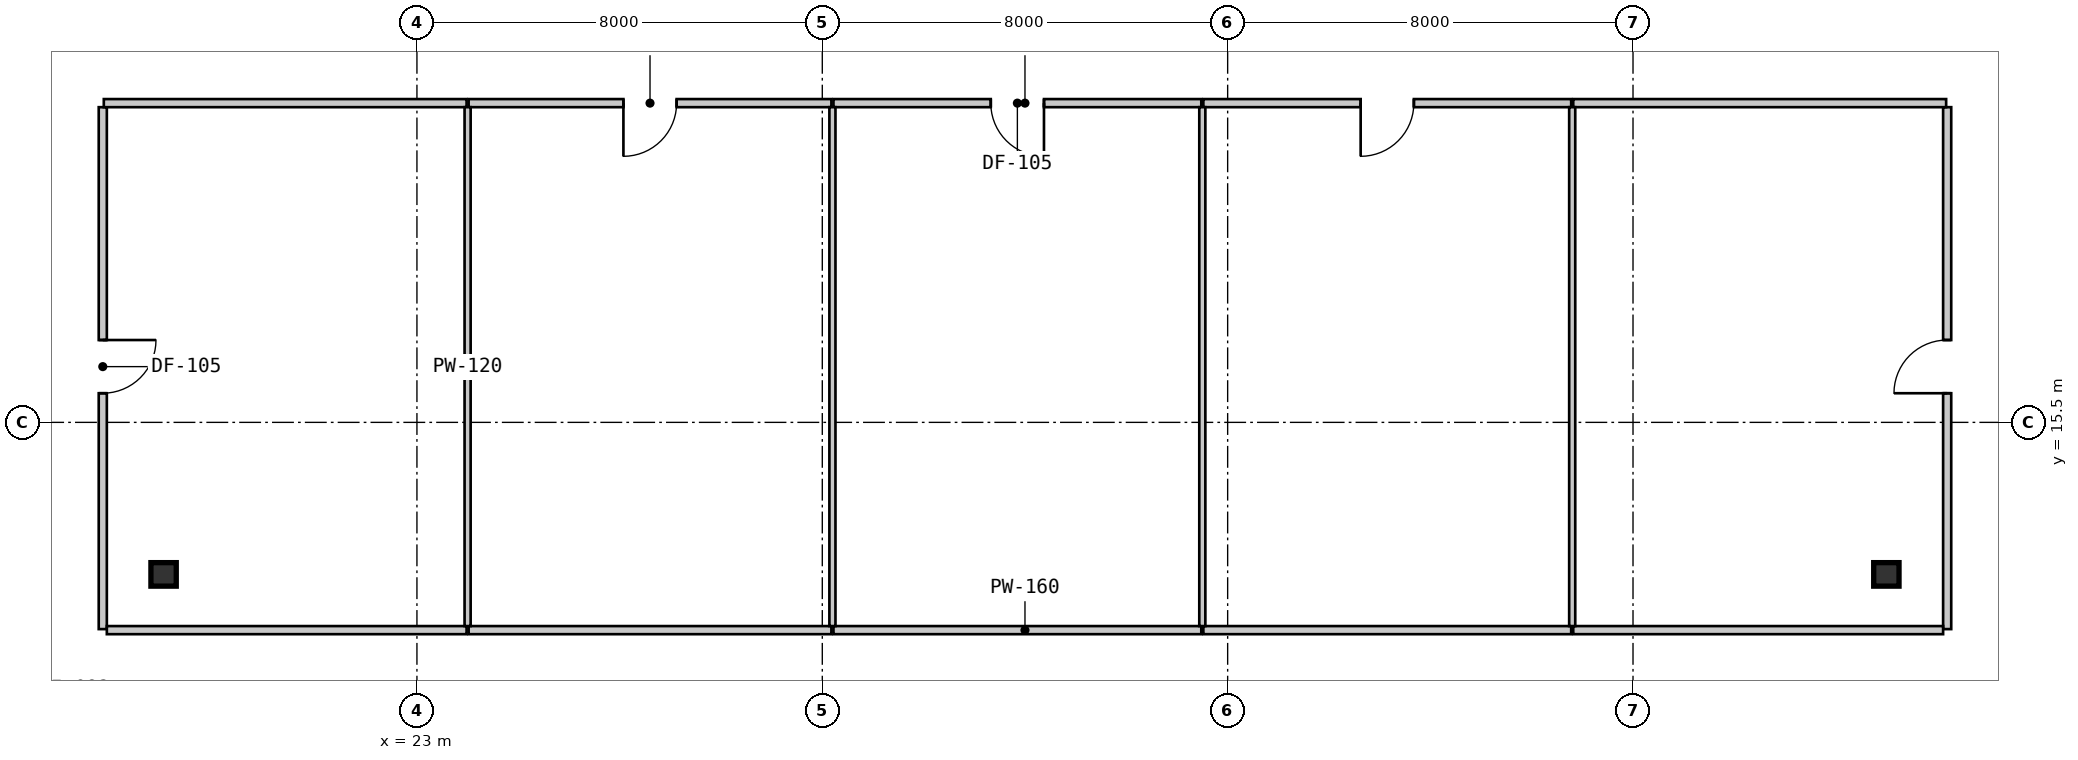
"""IFC4 building model, lengths in metres.
Left out: names, types, materials, properties, quantities, classifications, styles, units other than length and angle.
Written with IfcOpenShell. Run it as: python <this file> out.ifc"""

import sys

from ifc_helpers import new_model, si_unit, direction, frame, frame_2d, origin, origin_2d, place, context, subcontext, project, spatial, rectangle, i_section, extrude, source, transform, mapped, element, fill, save


model = new_model("IFC4")
c1 = context("Model", 3, precision=1e-05, world=origin(), true_north=direction((0.0, 1.0)))
c2 = subcontext(c1, "Body", "Model", "MODEL_VIEW")
j1 = project(units=[si_unit("LENGTHUNIT", "METRE"), si_unit("PLANEANGLEUNIT", "RADIAN")], contexts=[c1])
p1 = place(None, origin())
s1 = spatial("IfcSite", under=j1, at=p1, CompositionType="ELEMENT")
p2 = place(p1, origin())
s2 = spatial("IfcBuilding", under=s1, at=p2, CompositionType="ELEMENT")
p3 = place(p2, frame((0.0, 0.0, 32.55)))
s3 = spatial("IfcBuildingStorey", under=s2, at=p3, CompositionType="ELEMENT", Elevation=32.55)
m1 = source(origin(), c2, "Body", "SweptSolid", [
    extrude(i_section(OverallWidth=0.5, OverallDepth=0.464, WebThickness=0.022, FlangeThickness=0.034, at=origin_2d()), origin(), (0.0, 0.0, 1.0), 3.15),
])
for number, where, z_axis, x_axis in (
    (1, (18.0, 12.5, 0.0), (0.0, 0.0, 1.0), (1.0, 0.0, 0.0)),
    (2, (52.0, 12.5, 0.0), (0.0, 0.0, 1.0), (1.0, 0.0, 0.0)),
):
    element("IfcColumn", number, at=place(p3, frame(where, z_axis=z_axis, x_axis=x_axis)), inside=s3, PredefinedType="COLUMN", context=c2, shape_type="MappedRepresentation", body=[
        mapped(m1, transform((0.0, 0.0, 0.0), scale=1.0)),
    ])
m2 = source(origin(), c2, "Body", "SweptSolid", [
    extrude(rectangle(XDim=10.3, YDim=0.16, at=frame_2d((5.15, 0.0))), origin(), (0.0, 0.0, 1.0), 2.93),
])
p4 = place(p3, frame((16.8, 21.72, 0.0), z_axis=(0.0, 0.0, 1.0), x_axis=(0.0, -1.0, 0.0)))
e3 = element("IfcWall", 3, at=p4, inside=s3, PredefinedType="PARTITIONING", context=c2, shape_type="MappedRepresentation", body=[
    mapped(m2, transform((0.0, 0.0, 0.0), scale=1.0)),
])
m3 = source(origin(), c2, "Body", "SweptSolid", [
    extrude(rectangle(XDim=1.05, YDim=2.1, at=frame_2d((0.525, 1.05))), frame((0.0, 0.09, 0.0), z_axis=(0.0, -1.0, 0.0), x_axis=(1.0, 0.0, 0.0)), (0.0, 0.0, 1.0), 0.18),
])
p5 = place(p4, frame((4.595, 0.0, 0.0)))
e4 = element("IfcOpeningElement", 4, at=p5, cuts=e3, PredefinedType="OPENING", context=c2, shape_type="MappedRepresentation", body=[
    mapped(m3, transform((0.0, 0.0, 0.0), scale=1.0)),
])
m4 = source(origin(), c2, "Body", "SweptSolid", [
    extrude(rectangle(XDim=7.159, YDim=0.16, at=frame_2d((3.58, 0.0))), origin(), (0.0, 0.0, 1.0), 2.93),
])
p6 = place(p3, frame((23.98, 21.8, 0.0), z_axis=(0.0, 0.0, 1.0), x_axis=(-1.0, 0.0, 0.0)))
e5 = element("IfcWall", 5, at=p6, inside=s3, PredefinedType="PARTITIONING", context=c2, shape_type="MappedRepresentation", body=[
    mapped(m4, transform((0.0, 0.0, 0.0), scale=1.0)),
])
p7 = place(p3, frame((31.18, 21.8, 0.0), z_axis=(0.0, 0.0, 1.0), x_axis=(-1.0, 0.0, 0.0)))
e6 = element("IfcWall", 6, at=p7, inside=s3, PredefinedType="PARTITIONING", context=c2, shape_type="MappedRepresentation", body=[
    mapped(m4, transform((0.0, 0.0, 0.0), scale=1.0)),
])
p8 = place(p7, frame((3.055, 0.0, 0.0)))
e7 = element("IfcOpeningElement", 7, at=p8, cuts=e6, PredefinedType="OPENING", context=c2, shape_type="MappedRepresentation", body=[
    mapped(m3, transform((0.0, 0.0, 0.0), scale=1.0)),
])
m5 = source(origin(), c2, "Body", "SweptSolid", [
    extrude(rectangle(XDim=7.26, YDim=0.16, at=frame_2d((3.63, 0.0))), origin(), (0.0, 0.0, 1.0), 2.93),
])
p9 = place(p3, frame((38.48, 21.8, 0.0), z_axis=(0.0, 0.0, 1.0), x_axis=(-1.0, 0.0, 0.0)))
e8 = element("IfcWall", 8, at=p9, inside=s3, PredefinedType="PARTITIONING", context=c2, shape_type="MappedRepresentation", body=[
    mapped(m5, transform((0.0, 0.0, 0.0), scale=1.0)),
])
p10 = place(p9, frame((3.105, 0.0, 0.0)))
e9 = element("IfcOpeningElement", 9, at=p10, cuts=e8, PredefinedType="OPENING", context=c2, shape_type="MappedRepresentation", body=[
    mapped(m3, transform((0.0, 0.0, 0.0), scale=1.0)),
])
p11 = place(p3, frame((45.78, 21.8, 0.0), z_axis=(0.0, 0.0, 1.0), x_axis=(-1.0, 0.0, 0.0)))
e10 = element("IfcWall", 10, at=p11, inside=s3, PredefinedType="PARTITIONING", context=c2, shape_type="MappedRepresentation", body=[
    mapped(m5, transform((0.0, 0.0, 0.0), scale=1.0)),
])
p12 = place(p11, frame((3.105, 0.0, 0.0)))
e11 = element("IfcOpeningElement", 11, at=p12, cuts=e10, PredefinedType="OPENING", context=c2, shape_type="MappedRepresentation", body=[
    mapped(m3, transform((0.0, 0.0, 0.0), scale=1.0)),
])
p13 = place(p3, frame((53.2, 11.42, 0.0), z_axis=(0.0, 0.0, 1.0), x_axis=(0.0, 1.0, 0.0)))
e12 = element("IfcWall", 12, at=p13, inside=s3, PredefinedType="PARTITIONING", context=c2, shape_type="MappedRepresentation", body=[
    mapped(m2, transform((0.0, 0.0, 0.0), scale=1.0)),
])
p14 = place(p13, frame((4.655, 0.0, 0.0)))
e13 = element("IfcOpeningElement", 13, at=p14, cuts=e12, PredefinedType="OPENING", context=c2, shape_type="MappedRepresentation", body=[
    mapped(m3, transform((0.0, 0.0, 0.0), scale=1.0)),
])
m6 = source(origin(), c2, "Body", "SweptSolid", [
    extrude(rectangle(XDim=7.359, YDim=0.16, at=frame_2d((3.68, 0.0))), origin(), (0.0, 0.0, 1.0), 2.93),
])
p15 = place(p3, frame((53.18, 21.8, 0.0), z_axis=(0.0, 0.0, 1.0), x_axis=(-1.0, 0.0, 0.0)))
e14 = element("IfcWall", 14, at=p15, inside=s3, PredefinedType="PARTITIONING", context=c2, shape_type="MappedRepresentation", body=[
    mapped(m6, transform((0.0, 0.0, 0.0), scale=1.0)),
])
m7 = source(origin(), c2, "Body", "SweptSolid", [
    extrude(rectangle(XDim=7.1, YDim=0.16, at=frame_2d((3.55, 0.0))), origin(), (0.0, 0.0, 1.0), 2.93),
])
p16 = place(p3, frame((16.88, 11.4, 0.0), z_axis=(0.0, 0.0, 1.0), x_axis=(1.0, 0.0, 0.0)))
e15 = element("IfcWall", 15, at=p16, inside=s3, PredefinedType="PARTITIONING", context=c2, shape_type="MappedRepresentation", body=[
    mapped(m7, transform((0.0, 0.0, 0.0), scale=1.0)),
])
p17 = place(p3, frame((24.02, 11.4, 0.0), z_axis=(0.0, 0.0, 1.0), x_axis=(1.0, 0.0, 0.0)))
e16 = element("IfcWall", 16, at=p17, inside=s3, PredefinedType="PARTITIONING", context=c2, shape_type="MappedRepresentation", body=[
    mapped(m4, transform((0.0, 0.0, 0.0), scale=1.0)),
])
for number, where, z_axis, x_axis in (
    (17, (31.22, 11.4, 0.0), (0.0, 0.0, 1.0), (1.0, 0.0, 0.0)),
    (18, (38.52, 11.4, 0.0), (0.0, 0.0, 1.0), (1.0, 0.0, 0.0)),
):
    element("IfcWall", number, at=place(p3, frame(where, z_axis=z_axis, x_axis=x_axis)), inside=s3, PredefinedType="PARTITIONING", context=c2, shape_type="MappedRepresentation", body=[
        mapped(m5, transform((0.0, 0.0, 0.0), scale=1.0)),
    ])
m8 = source(origin(), c2, "Body", "SweptSolid", [
    extrude(rectangle(XDim=7.3, YDim=0.16, at=frame_2d((3.65, 0.0))), origin(), (0.0, 0.0, 1.0), 2.93),
])
p18 = place(p3, frame((45.82, 11.4, 0.0), z_axis=(0.0, 0.0, 1.0), x_axis=(1.0, 0.0, 0.0)))
e19 = element("IfcWall", 19, at=p18, inside=s3, PredefinedType="PARTITIONING", context=c2, shape_type="MappedRepresentation", body=[
    mapped(m8, transform((0.0, 0.0, 0.0), scale=1.0)),
])
m9 = source(origin(), c2, "Body", "SweptSolid", [
    extrude(rectangle(XDim=10.24, YDim=0.12, at=frame_2d((5.12, 0.0))), origin(), (0.0, 0.0, 1.0), 2.93),
])
for number, where, z_axis, x_axis in (
    (20, (24.0, 21.72, 0.0), (0.0, 0.0, 1.0), (0.0, -1.0, 0.0)),
    (21, (31.2, 21.72, 0.0), (0.0, 0.0, 1.0), (0.0, -1.0, 0.0)),
    (22, (38.5, 21.72, 0.0), (0.0, 0.0, 1.0), (0.0, -1.0, 0.0)),
    (23, (45.8, 21.72, 0.0), (0.0, 0.0, 1.0), (0.0, -1.0, 0.0)),
):
    element("IfcWall", number, at=place(p3, frame(where, z_axis=z_axis, x_axis=x_axis)), inside=s3, PredefinedType="PARTITIONING", context=c2, shape_type="MappedRepresentation", body=[
        mapped(m9, transform((0.0, 0.0, 0.0), scale=1.0)),
    ])
m10 = source(origin(), c2, "Body", "SweptSolid", [
    extrude(rectangle(XDim=1.05, YDim=2.1, at=frame_2d((0.525, 1.05))), frame((0.0, 0.025, 0.0), z_axis=(0.0, -1.0, 0.0), x_axis=(1.0, 0.0, 0.0)), (0.0, 0.0, 1.0), 0.05),
])
p19 = place(p5, origin())
e24 = element("IfcDoor", 24, at=p19, inside=s3, OperationType="SINGLE_SWING_LEFT", PredefinedType="DOOR", context=c2, shape_type="MappedRepresentation", body=[
    mapped(m10, transform((0.0, 0.0, 0.0), scale=1.0)),
])
fill(e4, e24)
p20 = place(p8, origin())
e25 = element("IfcDoor", 25, at=p20, inside=s3, OperationType="SINGLE_SWING_RIGHT", PredefinedType="DOOR", context=c2, shape_type="MappedRepresentation", body=[
    mapped(m10, transform((0.0, 0.0, 0.0), scale=1.0)),
])
fill(e7, e25)
p21 = place(p10, origin())
e26 = element("IfcDoor", 26, at=p21, inside=s3, OperationType="SINGLE_SWING_LEFT", PredefinedType="DOOR", context=c2, shape_type="MappedRepresentation", body=[
    mapped(m10, transform((0.0, 0.0, 0.0), scale=1.0)),
])
fill(e9, e26)
p22 = place(p12, origin())
e27 = element("IfcDoor", 27, at=p22, inside=s3, OperationType="SINGLE_SWING_RIGHT", PredefinedType="DOOR", context=c2, shape_type="MappedRepresentation", body=[
    mapped(m10, transform((0.0, 0.0, 0.0), scale=1.0)),
])
fill(e11, e27)
p23 = place(p14, origin())
e28 = element("IfcDoor", 28, at=p23, inside=s3, OperationType="SINGLE_SWING_LEFT", PredefinedType="DOOR", context=c2, shape_type="MappedRepresentation", body=[
    mapped(m10, transform((0.0, 0.0, 0.0), scale=1.0)),
])
fill(e13, e28)
save(model, sys.argv[1])
